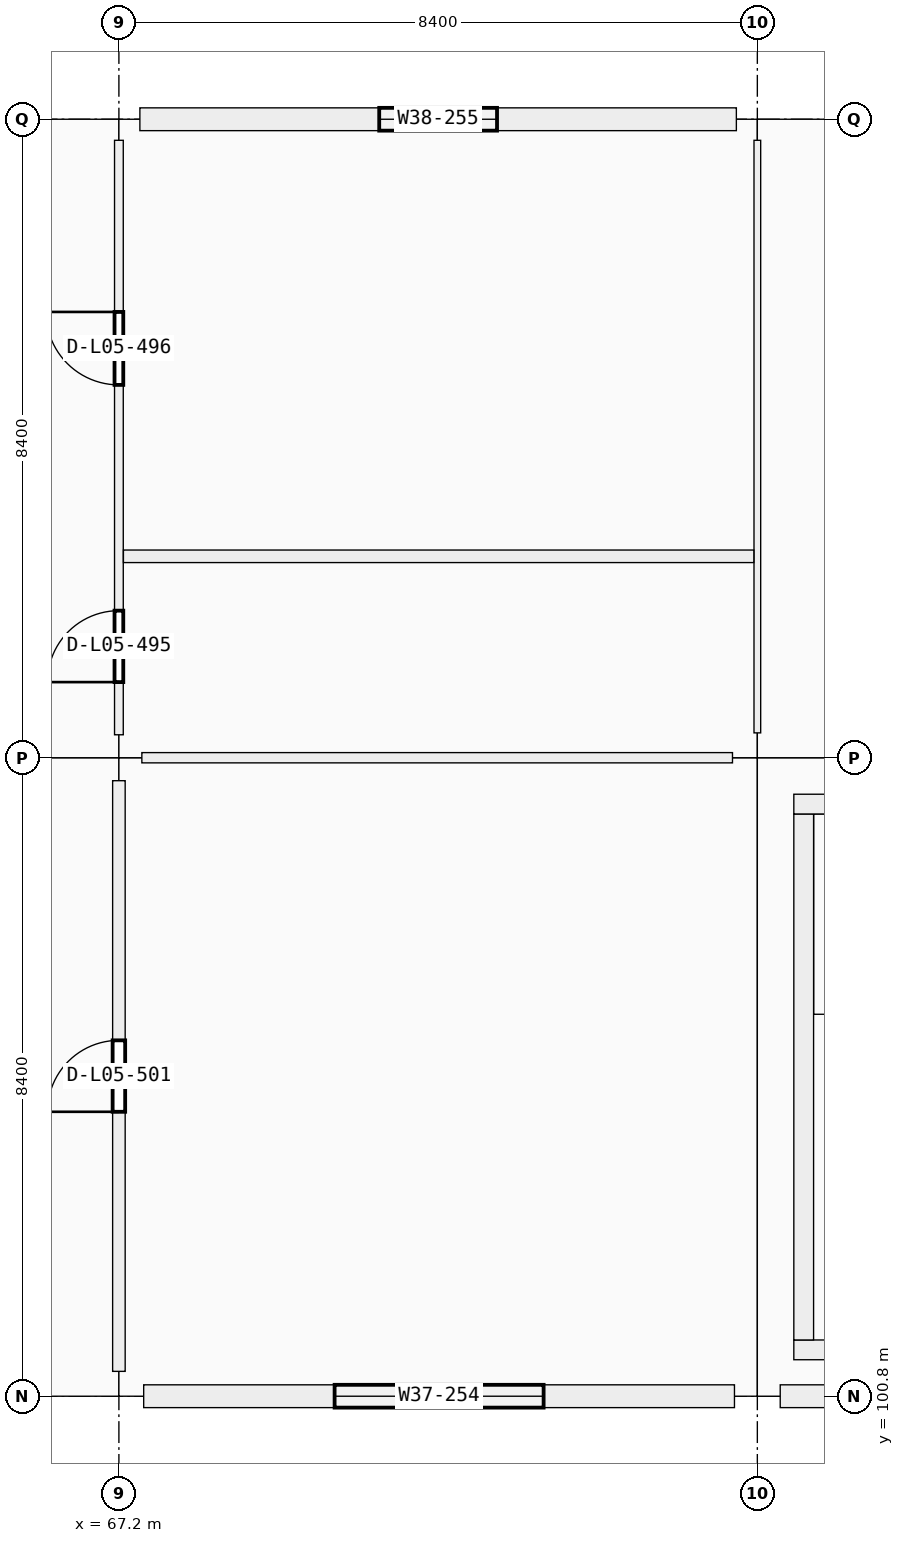
"""IFC4 building model, lengths in metres.
Left out: names, types, materials, properties, quantities, classifications, styles, units other than length and angle.
Written with IfcOpenShell. Run it as: python <this file> out.ifc"""

import sys

from ifc_helpers import new_model, si_unit, direction, frame, frame_2d, origin, origin_2d, place, context, subcontext, project, spatial, rectangle, extrude, element, fill, save


model = new_model("IFC4")
c1 = context("Model", 3, precision=1e-05, world=origin(), true_north=direction((0.0, 1.0)))
c2 = subcontext(c1, "Body", "Model", "MODEL_VIEW")
j1 = project(units=[si_unit("LENGTHUNIT", "METRE"), si_unit("PLANEANGLEUNIT", "RADIAN")], contexts=[c1])
p1 = place(None, origin())
s1 = spatial("IfcSite", under=j1, at=p1, CompositionType="ELEMENT")
p2 = place(p1, origin())
s2 = spatial("IfcBuilding", under=s1, at=p2, CompositionType="ELEMENT")
p3 = place(p2, frame((0.0, 0.0, 23.4)))
s3 = spatial("IfcBuildingStorey", under=s2, at=p3, CompositionType="ELEMENT", Elevation=23.4)
p4 = place(p3, frame((67.2, 100.8, 0.0), z_axis=(0.0, 0.0, 1.0), x_axis=(1.0, 0.0, 0.0)))
e1 = element("IfcColumn", 1, at=p4, inside=s3, PredefinedType="COLUMN", context=c2, shape_type="SweptSolid", body=[
    extrude(rectangle(XDim=0.65, YDim=0.65, at=origin_2d()), origin(), (0.0, 0.0, 1.0), 4.32),
])
p5 = place(p3, frame((67.2, 109.2, 0.0), z_axis=(0.0, 0.0, 1.0), x_axis=(1.0, 0.0, 0.0)))
e2 = element("IfcColumn", 2, at=p5, inside=s3, PredefinedType="COLUMN", context=c2, shape_type="SweptSolid", body=[
    extrude(rectangle(XDim=0.6, YDim=0.6, at=origin_2d()), origin(), (0.0, 0.0, 1.0), 4.32),
])
p6 = place(p3, frame((67.2, 117.6, 0.0), z_axis=(0.0, 0.0, 1.0), x_axis=(1.0, 0.0, 0.0)))
e3 = element("IfcColumn", 3, at=p6, inside=s3, PredefinedType="COLUMN", context=c2, shape_type="SweptSolid", body=[
    extrude(rectangle(XDim=0.55, YDim=0.55, at=origin_2d()), origin(), (0.0, 0.0, 1.0), 4.07),
])
p7 = place(p3, frame((75.6, 100.8, 0.0), z_axis=(0.0, 0.0, 1.0), x_axis=(1.0, 0.0, 0.0)))
e4 = element("IfcColumn", 4, at=p7, inside=s3, PredefinedType="COLUMN", context=c2, shape_type="SweptSolid", body=[
    extrude(rectangle(XDim=0.6, YDim=0.6, at=origin_2d()), origin(), (0.0, 0.0, 1.0), 4.32),
])
p8 = place(p3, frame((75.6, 109.2, 0.0), z_axis=(0.0, 0.0, 1.0), x_axis=(1.0, 0.0, 0.0)))
e5 = element("IfcColumn", 5, at=p8, inside=s3, PredefinedType="COLUMN", context=c2, shape_type="SweptSolid", body=[
    extrude(rectangle(XDim=0.65, YDim=0.65, at=origin_2d()), origin(), (0.0, 0.0, 1.0), 4.32),
])
p9 = place(p3, frame((75.6, 117.6, 0.0), z_axis=(0.0, 0.0, 1.0), x_axis=(1.0, 0.0, 0.0)))
e6 = element("IfcColumn", 6, at=p9, inside=s3, PredefinedType="COLUMN", context=c2, shape_type="SweptSolid", body=[
    extrude(rectangle(XDim=0.55, YDim=0.55, at=origin_2d()), origin(), (0.0, 0.0, 1.0), 4.07),
])
p10 = place(p3, frame((75.299, 100.8, 0.0), z_axis=(0.0, 0.0, 1.0), x_axis=(-1.0, 0.0, 0.0)))
e7 = element("IfcWall", 7, at=p10, inside=s3, PredefinedType="SOLIDWALL", context=c2, shape_type="SweptSolid", body=[
    extrude(rectangle(XDim=7.773, YDim=0.3, at=frame_2d((3.887, 0.0))), origin(), (0.0, 0.0, 1.0), 3.37),
])
p11 = place(p10, frame((2.511, 0.0, 0.9)))
e8 = element("IfcOpeningElement", 8, at=p11, cuts=e7, PredefinedType="OPENING", context=c2, shape_type="SweptSolid", body=[
    extrude(rectangle(XDim=2.75, YDim=1.6, at=frame_2d((1.375, 0.8))), frame((0.0, 0.15, 0.0), z_axis=(0.0, -1.0, 0.0), x_axis=(1.0, 0.0, 0.0)), (0.0, 0.0, 1.0), 0.3),
])
p12 = place(p3, frame((67.476, 117.6, 0.0), z_axis=(0.0, 0.0, 1.0), x_axis=(1.0, 0.0, 0.0)))
e9 = element("IfcWall", 9, at=p12, inside=s3, PredefinedType="SOLIDWALL", context=c2, shape_type="SweptSolid", body=[
    extrude(rectangle(XDim=7.848, YDim=0.3, at=frame_2d((3.924, 0.0))), origin(), (0.0, 0.0, 1.0), 3.37),
])
p13 = place(p12, frame((3.149, 0.0, 0.9)))
e10 = element("IfcOpeningElement", 10, at=p13, cuts=e9, PredefinedType="OPENING", context=c2, shape_type="SweptSolid", body=[
    extrude(rectangle(XDim=1.55, YDim=1.6, at=frame_2d((0.775, 0.8))), frame((0.0, 0.15, 0.0), z_axis=(0.0, -1.0, 0.0), x_axis=(1.0, 0.0, 0.0)), (0.0, 0.0, 1.0), 0.3),
])
p14 = place(p3, frame((83.674, 100.8, 0.0), z_axis=(0.0, 0.0, 1.0), x_axis=(-1.0, 0.0, 0.0)))
e11 = element("IfcWall", 11, at=p14, inside=s3, PredefinedType="SOLIDWALL", context=c2, shape_type="SweptSolid", body=[
    extrude(rectangle(XDim=7.773, YDim=0.3, at=frame_2d((3.887, 0.0))), origin(), (0.0, 0.0, 1.0), 3.37),
])
p15 = place(p3, frame((83.52, 101.41, 0.0), z_axis=(0.0, 0.0, 1.0), x_axis=(-1.0, 0.0, 0.0)))
e12 = element("IfcWall", 12, at=p15, inside=s3, PredefinedType="SHEAR", context=c2, shape_type="SweptSolid", body=[
    extrude(rectangle(XDim=7.44, YDim=0.26, at=frame_2d((3.72, 0.0))), origin(), (0.0, 0.0, 1.0), 4.32),
])
p16 = place(p3, frame((76.21, 101.54, 0.0), z_axis=(0.0, 0.0, 1.0), x_axis=(0.0, 1.0, 0.0)))
e13 = element("IfcWall", 13, at=p16, inside=s3, PredefinedType="SHEAR", context=c2, shape_type="SweptSolid", body=[
    extrude(rectangle(XDim=6.92, YDim=0.26, at=frame_2d((3.46, 0.0))), origin(), (0.0, 0.0, 1.0), 4.32),
])
p17 = place(p3, frame((76.08, 108.59, 0.0), z_axis=(0.0, 0.0, 1.0), x_axis=(1.0, 0.0, 0.0)))
e14 = element("IfcWall", 14, at=p17, inside=s3, PredefinedType="SHEAR", context=c2, shape_type="SweptSolid", body=[
    extrude(rectangle(XDim=7.44, YDim=0.26, at=frame_2d((3.72, 0.0))), origin(), (0.0, 0.0, 1.0), 4.32),
])
p18 = place(p3, frame((67.502, 109.2, 0.0), z_axis=(0.0, 0.0, 1.0), x_axis=(1.0, 0.0, 0.0)))
e15 = element("IfcWall", 15, at=p18, inside=s3, PredefinedType="PARTITIONING", context=c2, shape_type="SweptSolid", body=[
    extrude(rectangle(XDim=7.771, YDim=0.135, at=frame_2d((3.885, 0.0))), origin(), (0.0, 0.0, 1.0), 3.19),
])
p19 = place(p3, frame((67.2, 101.127, 0.0), z_axis=(0.0, 0.0, 1.0), x_axis=(0.0, 1.0, 0.0)))
e16 = element("IfcWall", 16, at=p19, inside=s3, PredefinedType="PARTITIONING", context=c2, shape_type="SweptSolid", body=[
    extrude(rectangle(XDim=7.771, YDim=0.165, at=frame_2d((3.885, 0.0))), origin(), (0.0, 0.0, 1.0), 3.19),
])
p20 = place(p19, frame((3.415, 0.0, 0.0)))
e17 = element("IfcOpeningElement", 17, at=p20, cuts=e16, PredefinedType="OPENING", context=c2, shape_type="SweptSolid", body=[
    extrude(rectangle(XDim=0.94, YDim=2.15, at=frame_2d((0.47, 1.075))), frame((0.0, 0.083, 0.0), z_axis=(0.0, -1.0, 0.0), x_axis=(1.0, 0.0, 0.0)), (0.0, 0.0, 1.0), 0.165),
])
p21 = place(p3, frame((67.2, 109.502, 0.0), z_axis=(0.0, 0.0, 1.0), x_axis=(0.0, 1.0, 0.0)))
e18 = element("IfcWall", 18, at=p21, inside=s3, PredefinedType="PARTITIONING", context=c2, shape_type="SweptSolid", body=[
    extrude(rectangle(XDim=7.821, YDim=0.115, at=frame_2d((3.911, 0.0))), origin(), (0.0, 0.0, 1.0), 3.19),
])
p22 = place(p21, frame((0.693, 0.0, 0.0)))
e19 = element("IfcOpeningElement", 19, at=p22, cuts=e18, PredefinedType="OPENING", context=c2, shape_type="SweptSolid", body=[
    extrude(rectangle(XDim=0.94, YDim=2.08, at=frame_2d((0.47, 1.04))), frame((0.0, 0.058, 0.0), z_axis=(0.0, -1.0, 0.0), x_axis=(1.0, 0.0, 0.0)), (0.0, 0.0, 1.0), 0.115),
])
p23 = place(p21, frame((4.603, 0.0, 0.0)))
e20 = element("IfcOpeningElement", 20, at=p23, cuts=e18, PredefinedType="OPENING", context=c2, shape_type="SweptSolid", body=[
    extrude(rectangle(XDim=0.96, YDim=2.1, at=frame_2d((0.48, 1.05))), frame((0.0, 0.058, 0.0), z_axis=(0.0, -1.0, 0.0), x_axis=(1.0, 0.0, 0.0)), (0.0, 0.0, 1.0), 0.115),
])
p24 = place(p3, frame((75.6, 109.527, 0.0), z_axis=(0.0, 0.0, 1.0), x_axis=(0.0, 1.0, 0.0)))
e21 = element("IfcWall", 21, at=p24, inside=s3, PredefinedType="PARTITIONING", context=c2, shape_type="SweptSolid", body=[
    extrude(rectangle(XDim=7.796, YDim=0.088, at=frame_2d((3.898, 0.0))), origin(), (0.0, 0.0, 1.0), 3.19),
])
p25 = place(p3, frame((67.26, 111.85, 0.0), z_axis=(0.0, 0.0, 1.0), x_axis=(1.0, 0.0, 0.0)))
e22 = element("IfcWall", 22, at=p25, inside=s3, PredefinedType="PARTITIONING", context=c2, shape_type="SweptSolid", body=[
    extrude(rectangle(XDim=8.294, YDim=0.165, at=frame_2d((4.147, 0.0))), origin(), (0.0, 0.0, 1.0), 3.19),
])
p26 = place(p11, origin())
e23 = element("IfcWindow", 23, at=p26, inside=s3, PartitioningType="SINGLE_PANEL", PredefinedType="WINDOW", context=c2, shape_type="SweptSolid", body=[
    extrude(rectangle(XDim=2.75, YDim=1.6, at=frame_2d((1.375, 0.8))), frame((0.0, 0.03, 0.0), z_axis=(0.0, -1.0, 0.0), x_axis=(1.0, 0.0, 0.0)), (0.0, 0.0, 1.0), 0.06),
])
fill(e8, e23)
p27 = place(p13, origin())
e24 = element("IfcWindow", 24, at=p27, inside=s3, PartitioningType="SINGLE_PANEL", PredefinedType="WINDOW", context=c2, shape_type="SweptSolid", body=[
    extrude(rectangle(XDim=1.55, YDim=1.6, at=frame_2d((0.775, 0.8))), frame((0.0, 0.03, 0.0), z_axis=(0.0, -1.0, 0.0), x_axis=(1.0, 0.0, 0.0)), (0.0, 0.0, 1.0), 0.06),
])
fill(e10, e24)
p28 = place(p22, origin())
e25 = element("IfcDoor", 25, at=p28, inside=s3, OperationType="SINGLE_SWING_LEFT", PredefinedType="DOOR", context=c2, shape_type="SweptSolid", body=[
    extrude(rectangle(XDim=0.94, YDim=2.08, at=frame_2d((0.47, 1.04))), frame((0.0, 0.025, 0.0), z_axis=(0.0, -1.0, 0.0), x_axis=(1.0, 0.0, 0.0)), (0.0, 0.0, 1.0), 0.05),
])
fill(e19, e25)
p29 = place(p23, origin())
e26 = element("IfcDoor", 26, at=p29, inside=s3, OperationType="SINGLE_SWING_RIGHT", PredefinedType="DOOR", context=c2, shape_type="SweptSolid", body=[
    extrude(rectangle(XDim=0.96, YDim=2.1, at=frame_2d((0.48, 1.05))), frame((0.0, 0.025, 0.0), z_axis=(0.0, -1.0, 0.0), x_axis=(1.0, 0.0, 0.0)), (0.0, 0.0, 1.0), 0.05),
])
fill(e20, e26)
p30 = place(p20, origin())
e27 = element("IfcDoor", 27, at=p30, inside=s3, OperationType="SINGLE_SWING_LEFT", PredefinedType="DOOR", context=c2, shape_type="SweptSolid", body=[
    extrude(rectangle(XDim=0.94, YDim=2.15, at=frame_2d((0.47, 1.075))), frame((0.0, 0.025, 0.0), z_axis=(0.0, -1.0, 0.0), x_axis=(1.0, 0.0, 0.0)), (0.0, 0.0, 1.0), 0.05),
])
fill(e17, e27)
save(model, sys.argv[1])
